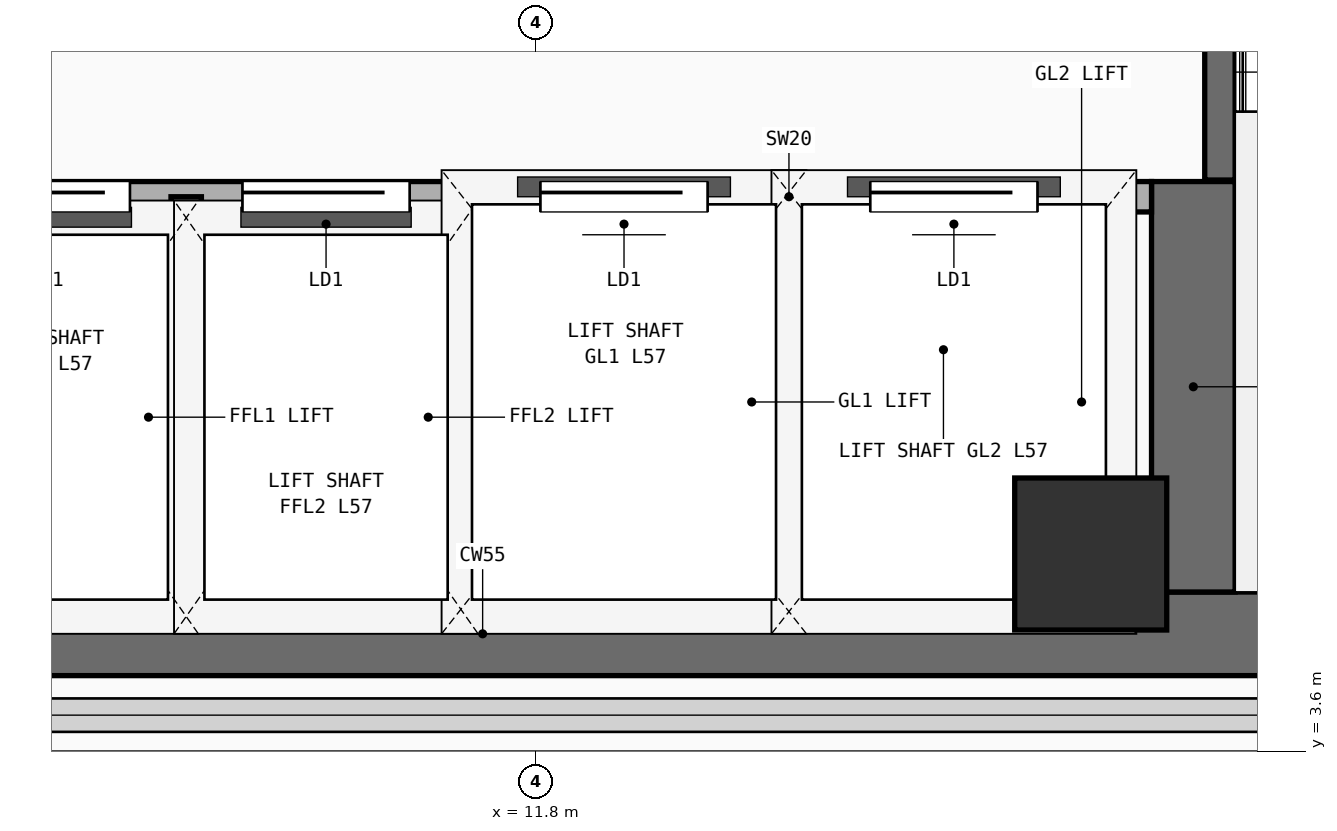
"""IFC4 building model, lengths in metres.
Left out: names, types, materials, properties, quantities, classifications, styles, units other than length and angle.
Written with IfcOpenShell. Run it as: python <this file> out.ifc"""

import sys

from ifc_helpers import new_model, si_unit, direction, frame, frame_2d, origin, origin_2d, place, context, subcontext, project, spatial, rectangle, extrude, element, fill, save


model = new_model("IFC4")
c1 = context("Model", 3, precision=1e-05, world=origin(), true_north=direction((0.0, 1.0)))
c2 = subcontext(c1, "Body", "Model", "MODEL_VIEW")
j1 = project(units=[si_unit("LENGTHUNIT", "METRE"), si_unit("PLANEANGLEUNIT", "RADIAN")], contexts=[c1])
p1 = place(None, origin())
s1 = spatial("IfcSite", under=j1, at=p1, CompositionType="ELEMENT")
p2 = place(p1, origin())
s2 = spatial("IfcBuilding", under=s1, at=p2, CompositionType="ELEMENT")
p3 = place(p2, frame((0.0, 0.0, 223.5)))
s3 = spatial("IfcBuildingStorey", under=s2, at=p3, CompositionType="ELEMENT", Elevation=223.5)
p4 = place(p3, frame((7.175, 4.375, 0.0), z_axis=(0.0, 0.0, 1.0), x_axis=(1.0, 0.0, 0.0)))
e1 = element("IfcWall", 1, at=p4, inside=s3, PredefinedType="SHEAR", context=c2, shape_type="SweptSolid", body=[
    extrude(rectangle(XDim=13.9, YDim=0.55, at=frame_2d((6.95, 0.0))), origin(), (0.0, 0.0, 1.0), 3.56),
])
p5 = place(p3, frame((16.125, 4.65, 0.0), z_axis=(0.0, 0.0, 1.0), x_axis=(0.0, 1.0, 0.0)))
e2 = element("IfcWall", 2, at=p5, inside=s3, PredefinedType="SHEAR", context=c2, shape_type="SweptSolid", body=[
    extrude(rectangle(XDim=2.7, YDim=0.55, at=frame_2d((1.35, 0.0))), origin(), (0.0, 0.0, 1.0), 3.56),
])
p6 = place(p3, frame((15.45, 4.9, 0.0), z_axis=(0.0, 0.0, 1.0), x_axis=(1.0, 0.0, 0.0)))
e3 = element("IfcColumn", 3, at=p6, inside=s3, PredefinedType="COLUMN", context=c2, shape_type="SweptSolid", body=[
    extrude(rectangle(XDim=1.0, YDim=1.0, at=origin_2d()), origin(), (0.0, 0.0, 1.0), 3.56),
])
p7 = place(p3, frame((16.3, 7.36, 0.0), z_axis=(0.0, 0.0, 1.0), x_axis=(0.0, 1.0, 0.0)))
e4 = element("IfcWall", 4, at=p7, inside=s3, PredefinedType="SHEAR", context=c2, shape_type="SweptSolid", body=[
    extrude(rectangle(XDim=2.58, YDim=0.2, at=frame_2d((1.29, 0.0))), origin(), (0.0, 0.0, 1.0), 3.56),
])
p8 = place(p3, frame((7.5, 7.25, 0.0), z_axis=(0.0, 0.0, 1.0), x_axis=(1.0, 0.0, 0.0)))
e5 = element("IfcWall", 5, at=p8, inside=s3, PredefinedType="PARTITIONING", context=c2, shape_type="SweptSolid", body=[
    extrude(rectangle(XDim=8.35, YDim=0.2, at=frame_2d((4.175, 0.0))), origin(), (0.0, 0.0, 1.0), 3.56),
])
p9 = place(p8, frame((0.53, 0.0, 0.0)))
e6 = element("IfcOpeningElement", 6, at=p9, cuts=e5, PredefinedType="OPENING", context=c2, shape_type="SweptSolid", body=[
    extrude(rectangle(XDim=1.1, YDim=2.2, at=frame_2d((0.55, 1.1))), frame((0.0, 0.11, 0.0), z_axis=(0.0, -1.0, 0.0), x_axis=(1.0, 0.0, 0.0)), (0.0, 0.0, 1.0), 0.22),
])
p10 = place(p8, frame((2.37, 0.0, 0.0)))
e7 = element("IfcOpeningElement", 7, at=p10, cuts=e5, PredefinedType="OPENING", context=c2, shape_type="SweptSolid", body=[
    extrude(rectangle(XDim=1.1, YDim=2.2, at=frame_2d((0.55, 1.1))), frame((0.0, 0.11, 0.0), z_axis=(0.0, -1.0, 0.0), x_axis=(1.0, 0.0, 0.0)), (0.0, 0.0, 1.0), 0.22),
])
p11 = place(p8, frame((4.33, 0.0, 0.0)))
e8 = element("IfcOpeningElement", 8, at=p11, cuts=e5, PredefinedType="OPENING", context=c2, shape_type="SweptSolid", body=[
    extrude(rectangle(XDim=1.1, YDim=2.2, at=frame_2d((0.55, 1.1))), frame((0.0, 0.11, 0.0), z_axis=(0.0, -1.0, 0.0), x_axis=(1.0, 0.0, 0.0)), (0.0, 0.0, 1.0), 0.22),
])
p12 = place(p8, frame((6.5, 0.0, 0.0)))
e9 = element("IfcOpeningElement", 9, at=p12, cuts=e5, PredefinedType="OPENING", context=c2, shape_type="SweptSolid", body=[
    extrude(rectangle(XDim=1.1, YDim=2.2, at=frame_2d((0.55, 1.1))), frame((0.0, 0.11, 0.0), z_axis=(0.0, -1.0, 0.0), x_axis=(1.0, 0.0, 0.0)), (0.0, 0.0, 1.0), 0.22),
])
for number, where, z_axis, x_axis in (
    (10, (9.5, 4.45, 0.0), (0.0, 0.0, 1.0), (0.0, 1.0, 0.0)),
    (11, (11.36, 4.45, 0.0), (0.0, 0.0, 1.0), (0.0, 1.0, 0.0)),
    (12, (13.46, 4.45, 0.0), (0.0, 0.0, 1.0), (0.0, 1.0, 0.0)),
):
    element("IfcWall", number, at=place(p3, frame(where, z_axis=z_axis, x_axis=x_axis)), inside=s3, PredefinedType="PARTITIONING", context=c2, shape_type="SweptSolid", body=[
        extrude(rectangle(XDim=2.8, YDim=0.2, at=frame_2d((1.4, 0.0))), origin(), (0.0, 0.0, 1.0), 3.56),
    ])
p13 = place(p9, origin())
e13 = element("IfcDoor", 13, at=p13, inside=s3, OperationType="SLIDING_TO_LEFT", PredefinedType="DOOR", context=c2, shape_type="SweptSolid", body=[
    extrude(rectangle(XDim=1.1, YDim=2.2, at=frame_2d((0.55, 1.1))), frame((0.0, 0.025, 0.0), z_axis=(0.0, -1.0, 0.0), x_axis=(1.0, 0.0, 0.0)), (0.0, 0.0, 1.0), 0.05),
])
fill(e6, e13)
p14 = place(p10, origin())
e14 = element("IfcDoor", 14, at=p14, inside=s3, OperationType="SLIDING_TO_LEFT", PredefinedType="DOOR", context=c2, shape_type="SweptSolid", body=[
    extrude(rectangle(XDim=1.1, YDim=2.2, at=frame_2d((0.55, 1.1))), frame((0.0, 0.025, 0.0), z_axis=(0.0, -1.0, 0.0), x_axis=(1.0, 0.0, 0.0)), (0.0, 0.0, 1.0), 0.05),
])
fill(e7, e14)
p15 = place(p11, origin())
e15 = element("IfcDoor", 15, at=p15, inside=s3, OperationType="SLIDING_TO_LEFT", PredefinedType="DOOR", context=c2, shape_type="SweptSolid", body=[
    extrude(rectangle(XDim=1.1, YDim=2.2, at=frame_2d((0.55, 1.1))), frame((0.0, 0.025, 0.0), z_axis=(0.0, -1.0, 0.0), x_axis=(1.0, 0.0, 0.0)), (0.0, 0.0, 1.0), 0.05),
])
fill(e8, e15)
p16 = place(p12, origin())
e16 = element("IfcDoor", 16, at=p16, inside=s3, OperationType="SLIDING_TO_LEFT", PredefinedType="DOOR", context=c2, shape_type="SweptSolid", body=[
    extrude(rectangle(XDim=1.1, YDim=2.2, at=frame_2d((0.55, 1.1))), frame((0.0, 0.025, 0.0), z_axis=(0.0, -1.0, 0.0), x_axis=(1.0, 0.0, 0.0)), (0.0, 0.0, 1.0), 0.05),
])
fill(e9, e16)
save(model, sys.argv[1])
